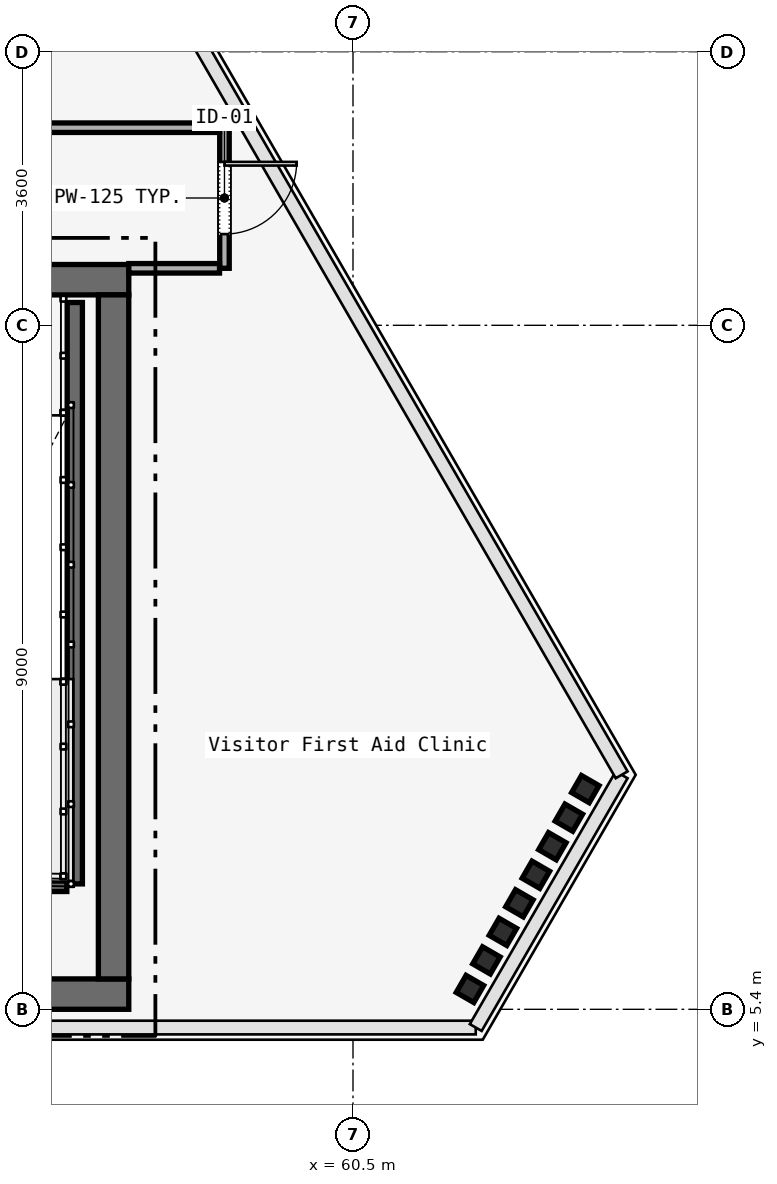
"""IFC4 building model, lengths in metres.
Left out: names, types, materials, properties, quantities, classifications, styles, units other than length and angle.
Written with IfcOpenShell. Run it as: python <this file> out.ifc"""

import sys

from ifc_helpers import new_model, si_unit, direction, frame, frame_2d, origin, origin_2d, place, context, subcontext, project, spatial, rectangle, i_section, extrude, element, fill, save


model = new_model("IFC4")
c1 = context("Model", 3, precision=1e-05, world=origin(), true_north=direction((0.0, 1.0)))
c2 = subcontext(c1, "Body", "Model", "MODEL_VIEW")
j1 = project(units=[si_unit("LENGTHUNIT", "METRE"), si_unit("PLANEANGLEUNIT", "RADIAN")], contexts=[c1])
p1 = place(None, origin())
s1 = spatial("IfcSite", under=j1, at=p1, CompositionType="ELEMENT")
p2 = place(p1, origin())
s2 = spatial("IfcBuilding", under=s1, at=p2, CompositionType="ELEMENT")
p3 = place(p2, frame((0.0, 0.0, 298.5)))
s3 = spatial("IfcBuildingStorey", under=s2, at=p3, CompositionType="ELEMENT", Elevation=298.5)
p4 = place(p3, frame((26.45, 15.0, 0.0), z_axis=(0.0, 0.0, 1.0), x_axis=(1.0, 0.0, 0.0)))
e1 = element("IfcWall", 1, at=p4, inside=s3, PredefinedType="SOLIDWALL", context=c2, shape_type="SweptSolid", body=[
    extrude(rectangle(XDim=31.1, YDim=0.4, at=frame_2d((15.55, 0.0))), origin(), (0.0, 0.0, 1.0), 4.52),
])
p5 = place(p4, frame((1.65, 0.0, 0.0)))
e2 = element("IfcOpeningElement", 2, at=p5, cuts=e1, PredefinedType="OPENING", context=c2, shape_type="SweptSolid", body=[
    extrude(rectangle(XDim=1.1, YDim=2.2, at=frame_2d((0.55, 1.1))), frame((0.0, 0.2, 0.0), z_axis=(0.0, -1.0, 0.0), x_axis=(1.0, 0.0, 0.0)), (0.0, 0.0, 1.0), 0.4),
])
p6 = place(p4, frame((13.65, 0.0, 0.0)))
e3 = element("IfcOpeningElement", 3, at=p6, cuts=e1, PredefinedType="OPENING", context=c2, shape_type="SweptSolid", body=[
    extrude(rectangle(XDim=1.1, YDim=2.2, at=frame_2d((0.55, 1.1))), frame((0.0, 0.2, 0.0), z_axis=(0.0, -1.0, 0.0), x_axis=(1.0, 0.0, 0.0)), (0.0, 0.0, 1.0), 0.4),
])
p7 = place(p4, frame((25.55, 0.0, 0.0)))
e4 = element("IfcOpeningElement", 4, at=p7, cuts=e1, PredefinedType="OPENING", context=c2, shape_type="SweptSolid", body=[
    extrude(rectangle(XDim=1.1, YDim=2.2, at=frame_2d((0.55, 1.1))), frame((0.0, 0.2, 0.0), z_axis=(0.0, -1.0, 0.0), x_axis=(1.0, 0.0, 0.0)), (0.0, 0.0, 1.0), 0.4),
])
p8 = place(p4, frame((19.35, 0.0, 0.0)))
e5 = element("IfcOpeningElement", 5, at=p8, cuts=e1, PredefinedType="OPENING", context=c2, shape_type="SweptSolid", body=[
    extrude(rectangle(XDim=1.1, YDim=2.2, at=frame_2d((0.55, 1.1))), frame((0.0, 0.2, 0.0), z_axis=(0.0, -1.0, 0.0), x_axis=(1.0, 0.0, 0.0)), (0.0, 0.0, 1.0), 0.4),
])
p9 = place(p4, frame((21.4, 0.0, 0.0)))
e6 = element("IfcOpeningElement", 6, at=p9, cuts=e1, PredefinedType="OPENING", context=c2, shape_type="SweptSolid", body=[
    extrude(rectangle(XDim=0.9, YDim=2.1, at=frame_2d((0.45, 1.05))), frame((0.0, 0.2, 0.0), z_axis=(0.0, -1.0, 0.0), x_axis=(1.0, 0.0, 0.0)), (0.0, 0.0, 1.0), 0.4),
])
p10 = place(p4, frame((6.54, 0.0, 0.0)))
e7 = element("IfcOpeningElement", 7, at=p10, cuts=e1, PredefinedType="OPENING", context=c2, shape_type="SweptSolid", body=[
    extrude(rectangle(XDim=0.95, YDim=2.2, at=frame_2d((0.475, 1.1))), frame((0.0, 0.2, 0.0), z_axis=(0.0, -1.0, 0.0), x_axis=(1.0, 0.0, 0.0)), (0.0, 0.0, 1.0), 0.4),
])
p11 = place(p4, frame((10.49, 0.0, 0.0)))
e8 = element("IfcOpeningElement", 8, at=p11, cuts=e1, PredefinedType="OPENING", context=c2, shape_type="SweptSolid", body=[
    extrude(rectangle(XDim=0.95, YDim=2.2, at=frame_2d((0.475, 1.1))), frame((0.0, 0.2, 0.0), z_axis=(0.0, -1.0, 0.0), x_axis=(1.0, 0.0, 0.0)), (0.0, 0.0, 1.0), 0.4),
])
p12 = place(p4, frame((23.35, 0.0, 0.0)))
e9 = element("IfcOpeningElement", 9, at=p12, cuts=e1, PredefinedType="OPENING", context=c2, shape_type="SweptSolid", body=[
    extrude(rectangle(XDim=1.3, YDim=2.3, at=frame_2d((0.65, 1.15))), frame((0.0, 0.2, 0.0), z_axis=(0.0, -1.0, 0.0), x_axis=(1.0, 0.0, 0.0)), (0.0, 0.0, 1.0), 0.4),
])
p13 = place(p3, frame((26.45, 5.6, 0.0), z_axis=(0.0, 0.0, 1.0), x_axis=(1.0, 0.0, 0.0)))
e10 = element("IfcWall", 10, at=p13, inside=s3, PredefinedType="SOLIDWALL", context=c2, shape_type="SweptSolid", body=[
    extrude(rectangle(XDim=31.1, YDim=0.4, at=frame_2d((15.55, 0.0))), origin(), (0.0, 0.0, 1.0), 4.52),
])
p14 = place(p3, frame((57.35, 5.8, 0.0), z_axis=(0.0, 0.0, 1.0), x_axis=(0.0, 1.0, 0.0)))
e11 = element("IfcWall", 11, at=p14, inside=s3, PredefinedType="SOLIDWALL", context=c2, shape_type="SweptSolid", body=[
    extrude(rectangle(XDim=9.0, YDim=0.4, at=frame_2d((4.5, 0.0))), origin(), (0.0, 0.0, 1.0), 4.52),
])
for number, where, z_axis, x_axis in (
    (12, (62.039, 5.668, 0.0), (0.0, 0.0, 1.0), (0.5, 0.866, 0.0)),
    (13, (62.256, 6.043, 0.0), (0.0, 0.0, 1.0), (0.5, 0.866, 0.0)),
    (14, (62.472, 6.419, 0.0), (0.0, 0.0, 1.0), (0.5, 0.866, 0.0)),
    (15, (62.689, 6.795, 0.0), (0.0, 0.0, 1.0), (0.5, 0.866, 0.0)),
    (16, (62.906, 7.17, 0.0), (0.0, 0.0, 1.0), (0.5, 0.866, 0.0)),
    (17, (63.123, 7.546, 0.0), (0.0, 0.0, 1.0), (0.5, 0.866, 0.0)),
    (18, (63.34, 7.922, 0.0), (0.0, 0.0, 1.0), (0.5, 0.866, 0.0)),
    (19, (63.557, 8.297, 0.0), (0.0, 0.0, 1.0), (0.5, 0.866, 0.0)),
):
    element("IfcColumn", number, at=place(p3, frame(where, z_axis=z_axis, x_axis=x_axis)), inside=s3, PredefinedType="COLUMN", context=c2, shape_type="SweptSolid", body=[
        extrude(i_section(OverallWidth=0.259, OverallDepth=0.267, WebThickness=0.013, FlangeThickness=0.021, FilletRadius=0.013, at=origin_2d()), origin(), (0.0, 0.0, 1.0), 4.52),
    ])
p15 = place(p3, frame((56.84, 14.7, 0.0), z_axis=(0.0, 0.0, 1.0), x_axis=(0.0, -1.0, 0.0)))
e20 = element("IfcWall", 20, at=p15, inside=s3, PredefinedType="SOLIDWALL", context=c2, shape_type="SweptSolid", body=[
    extrude(rectangle(XDim=7.65, YDim=0.2, at=frame_2d((3.825, 0.0))), origin(), (0.0, 0.0, 1.0), 4.8),
])
p16 = place(p3, frame((53.62, 7.05, 0.0), z_axis=(0.0, 0.0, 1.0), x_axis=(1.0, 0.0, 0.0)))
e21 = element("IfcWall", 21, at=p16, inside=s3, PredefinedType="SOLIDWALL", context=c2, shape_type="SweptSolid", body=[
    extrude(rectangle(XDim=3.115, YDim=0.2, at=frame_2d((1.558, 0.0))), origin(), (0.0, 0.0, 1.0), 4.8),
])
p17 = place(p3, frame((58.809, 17.0, 0.0), z_axis=(0.0, 0.0, 1.0), x_axis=(0.0, -1.0, 0.0)))
e22 = element("IfcWall", 22, at=p17, inside=s3, PredefinedType="PARTITIONING", context=c2, shape_type="SweptSolid", body=[
    extrude(rectangle(XDim=1.85, YDim=0.125, at=frame_2d((0.925, 0.0))), origin(), (0.0, 0.0, 1.0), 3.95),
])
p18 = place(p17, frame((0.45, 0.0, 0.0)))
e23 = element("IfcOpeningElement", 23, at=p18, cuts=e22, PredefinedType="OPENING", context=c2, shape_type="SweptSolid", body=[
    extrude(rectangle(XDim=0.95, YDim=2.2, at=frame_2d((0.475, 1.1))), frame((0.0, 0.062, 0.0), z_axis=(0.0, -1.0, 0.0), x_axis=(1.0, 0.0, 0.0)), (0.0, 0.0, 1.0), 0.125),
])
p19 = place(p3, frame((58.744, 15.15, 0.0), z_axis=(0.0, 0.0, 1.0), x_axis=(-1.0, 0.0, 0.0)))
e24 = element("IfcWall", 24, at=p19, inside=s3, PredefinedType="PARTITIONING", context=c2, shape_type="SweptSolid", body=[
    extrude(rectangle(XDim=1.194, YDim=0.125, at=frame_2d((0.597, 0.0))), origin(), (0.0, 0.0, 1.0), 3.95),
])
p20 = place(p3, frame((51.8, 17.0, 0.0), z_axis=(0.0, 0.0, 1.0), x_axis=(1.0, 0.0, 0.0)))
e25 = element("IfcWall", 25, at=p20, inside=s3, PredefinedType="PARTITIONING", context=c2, shape_type="SweptSolid", body=[
    extrude(rectangle(XDim=6.944, YDim=0.125, at=frame_2d((3.472, 0.0))), origin(), (0.0, 0.0, 1.0), 3.95),
])
p21 = place(p20, frame((2.997, 0.0, 0.0)))
e26 = element("IfcOpeningElement", 26, at=p21, cuts=e25, PredefinedType="OPENING", context=c2, shape_type="SweptSolid", body=[
    extrude(rectangle(XDim=0.95, YDim=2.2, at=frame_2d((0.475, 1.1))), frame((0.0, 0.062, 0.0), z_axis=(0.0, -1.0, 0.0), x_axis=(1.0, 0.0, 0.0)), (0.0, 0.0, 1.0), 0.125),
])
p22 = place(p18, origin())
e27 = element("IfcDoor", 27, at=p22, inside=s3, OperationType="SINGLE_SWING_LEFT", PredefinedType="DOOR", context=c2, shape_type="SweptSolid", body=[
    extrude(rectangle(XDim=0.95, YDim=2.2, at=frame_2d((0.475, 1.1))), frame((0.0, 0.025, 0.0), z_axis=(0.0, -1.0, 0.0), x_axis=(1.0, 0.0, 0.0)), (0.0, 0.0, 1.0), 0.05),
])
fill(e23, e27)
save(model, sys.argv[1])
